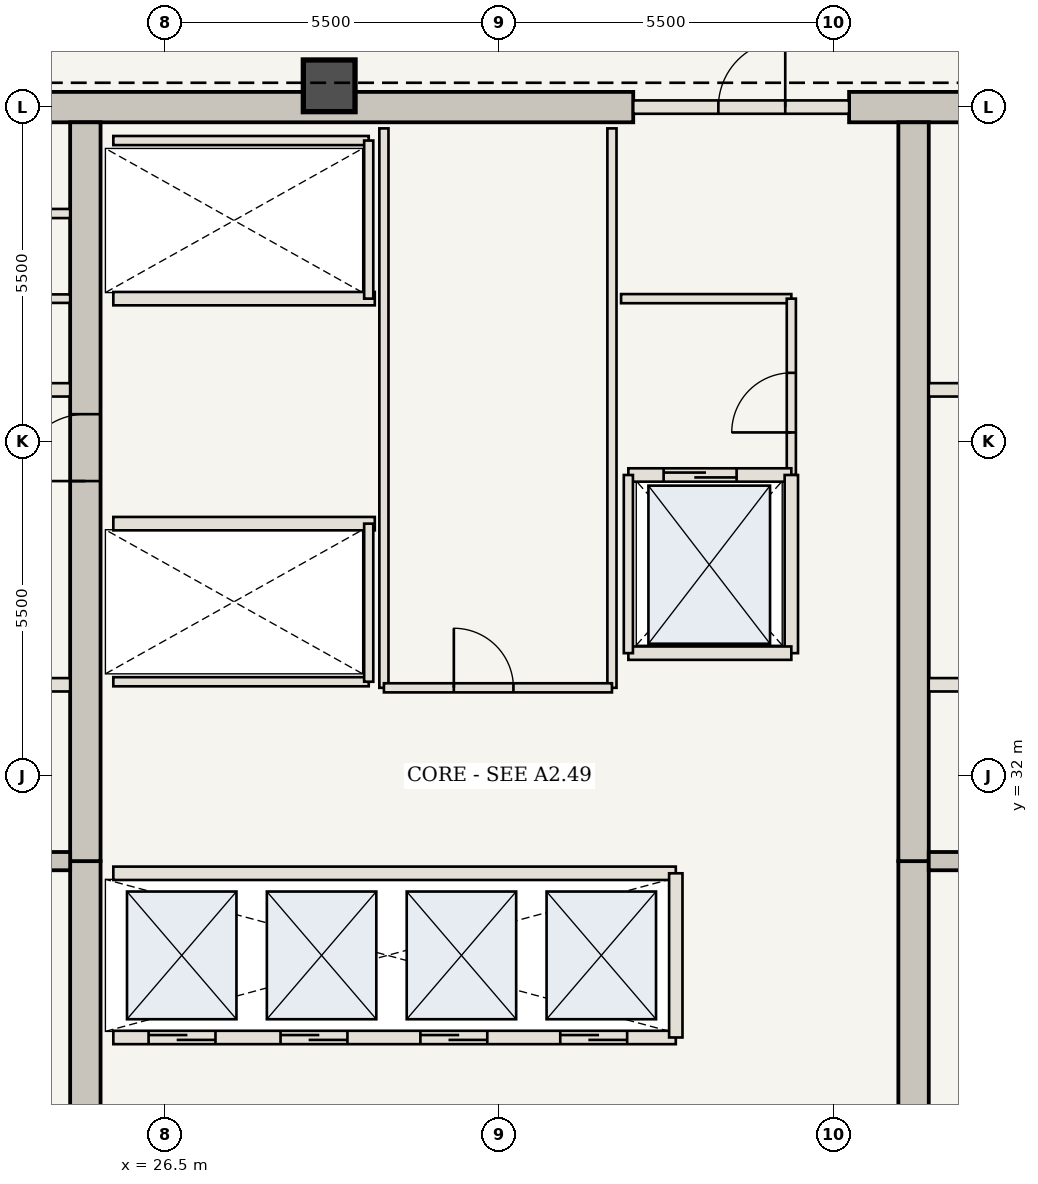
"""IFC4 building model, lengths in metres.
Left out: names, types, materials, properties, quantities, classifications, styles, units other than length and angle.
Written with IfcOpenShell. Run it as: python <this file> out.ifc"""

import sys

from ifc_helpers import new_model, si_unit, direction, frame, frame_2d, origin, origin_2d, place, context, subcontext, project, spatial, rectangle, extrude, element, fill, save


model = new_model("IFC4")
c1 = context("Model", 3, precision=1e-05, world=origin(), true_north=direction((0.0, 1.0)))
c2 = subcontext(c1, "Body", "Model", "MODEL_VIEW")
j1 = project(units=[si_unit("LENGTHUNIT", "METRE"), si_unit("PLANEANGLEUNIT", "RADIAN")], contexts=[c1])
p1 = place(None, origin())
s1 = spatial("IfcSite", under=j1, at=p1, CompositionType="ELEMENT")
p2 = place(p1, origin())
s2 = spatial("IfcBuilding", under=s1, at=p2, CompositionType="ELEMENT")
p3 = place(p2, frame((0.0, 0.0, 221.55)))
s3 = spatial("IfcBuildingStorey", under=s2, at=p3, CompositionType="ELEMENT", Elevation=221.55)
p4 = place(p3, frame((21.41, 43.0, 0.0), z_axis=(0.0, 0.0, 1.0), x_axis=(1.0, 0.0, 0.0)))
e1 = element("IfcWall", 1, at=p4, inside=s3, PredefinedType="SHEAR", context=c2, shape_type="SweptSolid", body=[
    extrude(rectangle(XDim=12.79, YDim=0.5, at=frame_2d((6.395, 0.0))), origin(), (0.0, 0.0, 1.0), 3.85),
])
p5 = place(p3, frame((37.75, 43.0, 0.0), z_axis=(0.0, 0.0, 1.0), x_axis=(1.0, 0.0, 0.0)))
e2 = element("IfcWall", 2, at=p5, inside=s3, PredefinedType="SHEAR", context=c2, shape_type="SweptSolid", body=[
    extrude(rectangle(XDim=4.84, YDim=0.5, at=frame_2d((2.42, 0.0))), origin(), (0.0, 0.0, 1.0), 3.85),
])
p6 = place(p3, frame((25.19, 21.2, 0.0), z_axis=(0.0, 0.0, 1.0), x_axis=(0.0, 1.0, 0.0)))
e3 = element("IfcWall", 3, at=p6, inside=s3, PredefinedType="SHEAR", context=c2, shape_type="SweptSolid", body=[
    extrude(rectangle(XDim=9.4, YDim=0.5, at=frame_2d((4.7, 0.0))), origin(), (0.0, 0.0, 1.0), 3.85),
])
p7 = place(p3, frame((25.19, 30.6, 0.0), z_axis=(0.0, 0.0, 1.0), x_axis=(0.0, 1.0, 0.0)))
e4 = element("IfcWall", 4, at=p7, inside=s3, PredefinedType="SHEAR", context=c2, shape_type="SweptSolid", body=[
    extrude(rectangle(XDim=12.15, YDim=0.5, at=frame_2d((6.075, 0.0))), origin(), (0.0, 0.0, 1.0), 3.85),
])
p8 = place(p7, frame((6.25, 0.0, 0.0)))
e5 = element("IfcOpeningElement", 5, at=p8, cuts=e4, PredefinedType="OPENING", context=c2, shape_type="SweptSolid", body=[
    extrude(rectangle(XDim=1.1, YDim=2.15, at=frame_2d((0.55, 1.075))), frame((0.0, 0.26, 0.0), z_axis=(0.0, -1.0, 0.0), x_axis=(1.0, 0.0, 0.0)), (0.0, 0.0, 1.0), 0.52),
])
p9 = place(p3, frame((38.81, 21.2, 0.0), z_axis=(0.0, 0.0, 1.0), x_axis=(0.0, 1.0, 0.0)))
e6 = element("IfcWall", 6, at=p9, inside=s3, PredefinedType="SHEAR", context=c2, shape_type="SweptSolid", body=[
    extrude(rectangle(XDim=9.4, YDim=0.5, at=frame_2d((4.7, 0.0))), origin(), (0.0, 0.0, 1.0), 3.85),
])
p10 = place(p3, frame((38.81, 30.6, 0.0), z_axis=(0.0, 0.0, 1.0), x_axis=(0.0, 1.0, 0.0)))
e7 = element("IfcWall", 7, at=p10, inside=s3, PredefinedType="SHEAR", context=c2, shape_type="SweptSolid", body=[
    extrude(rectangle(XDim=12.15, YDim=0.5, at=frame_2d((6.075, 0.0))), origin(), (0.0, 0.0, 1.0), 3.85),
])
p11 = place(p3, frame((29.2, 43.35, 0.0), z_axis=(0.0, 0.0, 1.0), x_axis=(1.0, 0.0, 0.0)))
e8 = element("IfcColumn", 8, at=p11, inside=s3, PredefinedType="COLUMN", context=c2, shape_type="SweptSolid", body=[
    extrude(rectangle(XDim=0.85, YDim=0.85, at=origin_2d()), origin(), (0.0, 0.0, 1.0), 3.85),
])
for number, where, z_axis, x_axis in (
    (9, (21.41, 30.6, 0.0), (0.0, 0.0, 1.0), (1.0, 0.0, 0.0)),
    (10, (39.06, 30.6, 0.0), (0.0, 0.0, 1.0), (1.0, 0.0, 0.0)),
):
    element("IfcWall", number, at=place(p3, frame(where, z_axis=z_axis, x_axis=x_axis)), inside=s3, PredefinedType="SHEAR", context=c2, shape_type="SweptSolid", body=[
        extrude(rectangle(XDim=3.53, YDim=0.3, at=frame_2d((1.765, 0.0))), origin(), (0.0, 0.0, 1.0), 3.685),
    ])
p12 = place(p3, frame((21.41, 33.5, 0.0), z_axis=(0.0, 0.0, 1.0), x_axis=(1.0, 0.0, 0.0)))
e11 = element("IfcWall", 11, at=p12, inside=s3, PredefinedType="STANDARD", context=c2, shape_type="SweptSolid", body=[
    extrude(rectangle(XDim=3.53, YDim=0.22, at=frame_2d((1.765, 0.0))), origin(), (0.0, 0.0, 1.0), 3.685),
])
p13 = place(p12, frame((0.75, 0.0, 0.0)))
e12 = element("IfcOpeningElement", 12, at=p13, cuts=e11, PredefinedType="OPENING", context=c2, shape_type="SweptSolid", body=[
    extrude(rectangle(XDim=1.2, YDim=2.2, at=frame_2d((0.6, 1.1))), frame((0.0, 0.12, 0.0), z_axis=(0.0, -1.0, 0.0), x_axis=(1.0, 0.0, 0.0)), (0.0, 0.0, 1.0), 0.24),
])
p14 = place(p3, frame((39.06, 33.5, 0.0), z_axis=(0.0, 0.0, 1.0), x_axis=(1.0, 0.0, 0.0)))
e13 = element("IfcWall", 13, at=p14, inside=s3, PredefinedType="STANDARD", context=c2, shape_type="SweptSolid", body=[
    extrude(rectangle(XDim=3.53, YDim=0.22, at=frame_2d((1.765, 0.0))), origin(), (0.0, 0.0, 1.0), 3.685),
])
p15 = place(p14, frame((1.55, 0.0, 0.0)))
e14 = element("IfcOpeningElement", 14, at=p15, cuts=e13, PredefinedType="OPENING", context=c2, shape_type="SweptSolid", body=[
    extrude(rectangle(XDim=1.2, YDim=2.2, at=frame_2d((0.6, 1.1))), frame((0.0, 0.12, 0.0), z_axis=(0.0, -1.0, 0.0), x_axis=(1.0, 0.0, 0.0)), (0.0, 0.0, 1.0), 0.24),
])
for number, where, z_axis, x_axis in (
    (15, (21.41, 38.35, 0.0), (0.0, 0.0, 1.0), (1.0, 0.0, 0.0)),
    (16, (39.06, 38.35, 0.0), (0.0, 0.0, 1.0), (1.0, 0.0, 0.0)),
):
    element("IfcWall", number, at=place(p3, frame(where, z_axis=z_axis, x_axis=x_axis)), inside=s3, PredefinedType="STANDARD", context=c2, shape_type="SweptSolid", body=[
        extrude(rectangle(XDim=3.53, YDim=0.22, at=frame_2d((1.765, 0.0))), origin(), (0.0, 0.0, 1.0), 3.685),
    ])
p16 = place(p3, frame((21.41, 39.85, 0.0), z_axis=(0.0, 0.0, 1.0), x_axis=(1.0, 0.0, 0.0)))
e17 = element("IfcWall", 17, at=p16, inside=s3, PredefinedType="STANDARD", context=c2, shape_type="SweptSolid", body=[
    extrude(rectangle(XDim=3.53, YDim=0.14, at=frame_2d((1.765, 0.0))), origin(), (0.0, 0.0, 1.0), 3.685),
])
p17 = place(p3, frame((21.41, 41.25, 0.0), z_axis=(0.0, 0.0, 1.0), x_axis=(1.0, 0.0, 0.0)))
e18 = element("IfcWall", 18, at=p17, inside=s3, PredefinedType="STANDARD", context=c2, shape_type="SweptSolid", body=[
    extrude(rectangle(XDim=3.53, YDim=0.15, at=frame_2d((1.765, 0.0))), origin(), (0.0, 0.0, 1.0), 3.685),
])
p18 = place(p3, frame((34.0, 39.85, 0.0), z_axis=(0.0, 0.0, 1.0), x_axis=(1.0, 0.0, 0.0)))
e19 = element("IfcWall", 19, at=p18, inside=s3, PredefinedType="STANDARD", context=c2, shape_type="SweptSolid", body=[
    extrude(rectangle(XDim=2.8, YDim=0.15, at=frame_2d((1.4, 0.0))), origin(), (0.0, 0.0, 1.0), 3.685),
])
p19 = place(p3, frame((36.8, 36.95, 0.0), z_axis=(0.0, 0.0, 1.0), x_axis=(0.0, 1.0, 0.0)))
e20 = element("IfcWall", 20, at=p19, inside=s3, PredefinedType="STANDARD", context=c2, shape_type="SweptSolid", body=[
    extrude(rectangle(XDim=2.9, YDim=0.15, at=frame_2d((1.45, 0.0))), origin(), (0.0, 0.0, 1.0), 3.685),
])
p20 = place(p19, frame((0.7, 0.0, 0.0)))
e21 = element("IfcOpeningElement", 21, at=p20, cuts=e20, PredefinedType="OPENING", context=c2, shape_type="SweptSolid", body=[
    extrude(rectangle(XDim=0.98, YDim=2.2, at=frame_2d((0.49, 1.1))), frame((0.0, 0.085, 0.0), z_axis=(0.0, -1.0, 0.0), x_axis=(1.0, 0.0, 0.0)), (0.0, 0.0, 1.0), 0.17),
])
p21 = place(p3, frame((25.65, 27.7, 0.0), z_axis=(0.0, 0.0, 1.0), x_axis=(1.0, 0.0, 0.0)))
e22 = element("IfcWall", 22, at=p21, inside=s3, PredefinedType="STANDARD", context=c2, shape_type="SweptSolid", body=[
    extrude(rectangle(XDim=9.25, YDim=0.22, at=frame_2d((4.625, 0.0))), origin(), (0.0, 0.0, 1.0), 3.685),
])
p22 = place(p21, frame((0.58, 0.0, 0.0)))
e23 = element("IfcOpeningElement", 23, at=p22, cuts=e22, PredefinedType="OPENING", context=c2, shape_type="SweptSolid", body=[
    extrude(rectangle(XDim=1.1, YDim=2.15, at=frame_2d((0.55, 1.075))), frame((0.0, 0.12, 0.0), z_axis=(0.0, -1.0, 0.0), x_axis=(1.0, 0.0, 0.0)), (0.0, 0.0, 1.0), 0.24),
])
p23 = place(p21, frame((2.75, 0.0, 0.0)))
e24 = element("IfcOpeningElement", 24, at=p23, cuts=e22, PredefinedType="OPENING", context=c2, shape_type="SweptSolid", body=[
    extrude(rectangle(XDim=1.1, YDim=2.15, at=frame_2d((0.55, 1.075))), frame((0.0, 0.12, 0.0), z_axis=(0.0, -1.0, 0.0), x_axis=(1.0, 0.0, 0.0)), (0.0, 0.0, 1.0), 0.24),
])
p24 = place(p21, frame((5.05, 0.0, 0.0)))
e25 = element("IfcOpeningElement", 25, at=p24, cuts=e22, PredefinedType="OPENING", context=c2, shape_type="SweptSolid", body=[
    extrude(rectangle(XDim=1.1, YDim=2.15, at=frame_2d((0.55, 1.075))), frame((0.0, 0.12, 0.0), z_axis=(0.0, -1.0, 0.0), x_axis=(1.0, 0.0, 0.0)), (0.0, 0.0, 1.0), 0.24),
])
p25 = place(p21, frame((7.35, 0.0, 0.0)))
e26 = element("IfcOpeningElement", 26, at=p25, cuts=e22, PredefinedType="OPENING", context=c2, shape_type="SweptSolid", body=[
    extrude(rectangle(XDim=1.1, YDim=2.15, at=frame_2d((0.55, 1.075))), frame((0.0, 0.12, 0.0), z_axis=(0.0, -1.0, 0.0), x_axis=(1.0, 0.0, 0.0)), (0.0, 0.0, 1.0), 0.24),
])
p26 = place(p3, frame((25.65, 30.4, 0.0), z_axis=(0.0, 0.0, 1.0), x_axis=(1.0, 0.0, 0.0)))
e27 = element("IfcWall", 27, at=p26, inside=s3, PredefinedType="STANDARD", context=c2, shape_type="SweptSolid", body=[
    extrude(rectangle(XDim=9.25, YDim=0.22, at=frame_2d((4.625, 0.0))), origin(), (0.0, 0.0, 1.0), 3.685),
])
p27 = place(p3, frame((34.9, 27.7, 0.0), z_axis=(0.0, 0.0, 1.0), x_axis=(0.0, 1.0, 0.0)))
e28 = element("IfcWall", 28, at=p27, inside=s3, PredefinedType="STANDARD", context=c2, shape_type="SweptSolid", body=[
    extrude(rectangle(XDim=2.7, YDim=0.22, at=frame_2d((1.35, 0.0))), origin(), (0.0, 0.0, 1.0), 3.685),
])
p28 = place(p3, frame((25.65, 36.15, 0.0), z_axis=(0.0, 0.0, 1.0), x_axis=(1.0, 0.0, 0.0)))
e29 = element("IfcWall", 29, at=p28, inside=s3, PredefinedType="STANDARD", context=c2, shape_type="SweptSolid", body=[
    extrude(rectangle(XDim=4.3, YDim=0.22, at=frame_2d((2.15, 0.0))), origin(), (0.0, 0.0, 1.0), 3.685),
])
p29 = place(p3, frame((25.65, 33.55, 0.0), z_axis=(0.0, 0.0, 1.0), x_axis=(1.0, 0.0, 0.0)))
e30 = element("IfcWall", 30, at=p29, inside=s3, PredefinedType="STANDARD", context=c2, shape_type="SweptSolid", body=[
    extrude(rectangle(XDim=4.2, YDim=0.15, at=frame_2d((2.1, 0.0))), origin(), (0.0, 0.0, 1.0), 3.685),
])
p30 = place(p3, frame((29.85, 33.55, 0.0), z_axis=(0.0, 0.0, 1.0), x_axis=(0.0, 1.0, 0.0)))
e31 = element("IfcWall", 31, at=p30, inside=s3, PredefinedType="STANDARD", context=c2, shape_type="SweptSolid", body=[
    extrude(rectangle(XDim=2.6, YDim=0.15, at=frame_2d((1.3, 0.0))), origin(), (0.0, 0.0, 1.0), 3.685),
])
p31 = place(p3, frame((25.65, 39.85, 0.0), z_axis=(0.0, 0.0, 1.0), x_axis=(1.0, 0.0, 0.0)))
e32 = element("IfcWall", 32, at=p31, inside=s3, PredefinedType="STANDARD", context=c2, shape_type="SweptSolid", body=[
    extrude(rectangle(XDim=4.3, YDim=0.22, at=frame_2d((2.15, 0.0))), origin(), (0.0, 0.0, 1.0), 3.685),
])
p32 = place(p3, frame((25.65, 42.45, 0.0), z_axis=(0.0, 0.0, 1.0), x_axis=(1.0, 0.0, 0.0)))
e33 = element("IfcWall", 33, at=p32, inside=s3, PredefinedType="STANDARD", context=c2, shape_type="SweptSolid", body=[
    extrude(rectangle(XDim=4.2, YDim=0.15, at=frame_2d((2.1, 0.0))), origin(), (0.0, 0.0, 1.0), 3.685),
])
p33 = place(p3, frame((29.85, 39.85, 0.0), z_axis=(0.0, 0.0, 1.0), x_axis=(0.0, 1.0, 0.0)))
e34 = element("IfcWall", 34, at=p33, inside=s3, PredefinedType="STANDARD", context=c2, shape_type="SweptSolid", body=[
    extrude(rectangle(XDim=2.6, YDim=0.15, at=frame_2d((1.3, 0.0))), origin(), (0.0, 0.0, 1.0), 3.685),
])
for number, where, z_axis, x_axis in (
    (35, (30.1, 33.45, 0.0), (0.0, 0.0, 1.0), (0.0, 1.0, 0.0)),
    (36, (33.85, 33.45, 0.0), (0.0, 0.0, 1.0), (0.0, 1.0, 0.0)),
):
    element("IfcWall", number, at=place(p3, frame(where, z_axis=z_axis, x_axis=x_axis)), inside=s3, PredefinedType="STANDARD", context=c2, shape_type="SweptSolid", body=[
        extrude(rectangle(XDim=9.2, YDim=0.15, at=frame_2d((4.6, 0.0))), origin(), (0.0, 0.0, 1.0), 3.685),
    ])
p34 = place(p3, frame((30.1, 33.45, 0.0), z_axis=(0.0, 0.0, 1.0), x_axis=(1.0, 0.0, 0.0)))
e37 = element("IfcWall", 37, at=p34, inside=s3, PredefinedType="STANDARD", context=c2, shape_type="SweptSolid", body=[
    extrude(rectangle(XDim=3.75, YDim=0.15, at=frame_2d((1.875, 0.0))), origin(), (0.0, 0.0, 1.0), 3.685),
])
p35 = place(p34, frame((1.15, 0.0, 0.0)))
e38 = element("IfcOpeningElement", 38, at=p35, cuts=e37, PredefinedType="OPENING", context=c2, shape_type="SweptSolid", body=[
    extrude(rectangle(XDim=0.98, YDim=2.2, at=frame_2d((0.49, 1.1))), frame((0.0, 0.085, 0.0), z_axis=(0.0, -1.0, 0.0), x_axis=(1.0, 0.0, 0.0)), (0.0, 0.0, 1.0), 0.17),
])
p36 = place(p3, frame((34.2, 43.0, 0.0), z_axis=(0.0, 0.0, 1.0), x_axis=(1.0, 0.0, 0.0)))
e39 = element("IfcWall", 39, at=p36, inside=s3, PredefinedType="STANDARD", context=c2, shape_type="SweptSolid", body=[
    extrude(rectangle(XDim=3.55, YDim=0.22, at=frame_2d((1.775, 0.0))), origin(), (0.0, 0.0, 1.0), 3.685),
])
p37 = place(p36, frame((1.4, 0.0, 0.0)))
e40 = element("IfcOpeningElement", 40, at=p37, cuts=e39, PredefinedType="OPENING", context=c2, shape_type="SweptSolid", body=[
    extrude(rectangle(XDim=1.1, YDim=2.15, at=frame_2d((0.55, 1.075))), frame((0.0, 0.12, 0.0), z_axis=(0.0, -1.0, 0.0), x_axis=(1.0, 0.0, 0.0)), (0.0, 0.0, 1.0), 0.24),
])
p38 = place(p3, frame((34.12, 36.95, 0.0), z_axis=(0.0, 0.0, 1.0), x_axis=(1.0, 0.0, 0.0)))
e41 = element("IfcWall", 41, at=p38, inside=s3, PredefinedType="STANDARD", context=c2, shape_type="SweptSolid", body=[
    extrude(rectangle(XDim=2.68, YDim=0.22, at=frame_2d((1.34, 0.0))), origin(), (0.0, 0.0, 1.0), 3.685),
])
p39 = place(p38, frame((0.58, 0.0, 0.0)))
e42 = element("IfcOpeningElement", 42, at=p39, cuts=e41, PredefinedType="OPENING", context=c2, shape_type="SweptSolid", body=[
    extrude(rectangle(XDim=1.2, YDim=2.2, at=frame_2d((0.6, 1.1))), frame((0.0, 0.12, 0.0), z_axis=(0.0, -1.0, 0.0), x_axis=(1.0, 0.0, 0.0)), (0.0, 0.0, 1.0), 0.24),
])
p40 = place(p3, frame((36.8, 34.02, 0.0), z_axis=(0.0, 0.0, 1.0), x_axis=(0.0, 1.0, 0.0)))
e43 = element("IfcWall", 43, at=p40, inside=s3, PredefinedType="STANDARD", context=c2, shape_type="SweptSolid", body=[
    extrude(rectangle(XDim=2.93, YDim=0.22, at=frame_2d((1.465, 0.0))), origin(), (0.0, 0.0, 1.0), 3.685),
])
p41 = place(p3, frame((34.12, 34.02, 0.0), z_axis=(0.0, 0.0, 1.0), x_axis=(1.0, 0.0, 0.0)))
e44 = element("IfcWall", 44, at=p41, inside=s3, PredefinedType="STANDARD", context=c2, shape_type="SweptSolid", body=[
    extrude(rectangle(XDim=2.68, YDim=0.22, at=frame_2d((1.34, 0.0))), origin(), (0.0, 0.0, 1.0), 3.685),
])
p42 = place(p3, frame((34.12, 34.02, 0.0), z_axis=(0.0, 0.0, 1.0), x_axis=(0.0, 1.0, 0.0)))
e45 = element("IfcWall", 45, at=p42, inside=s3, PredefinedType="STANDARD", context=c2, shape_type="SweptSolid", body=[
    extrude(rectangle(XDim=2.93, YDim=0.15, at=frame_2d((1.465, 0.0))), origin(), (0.0, 0.0, 1.0), 3.685),
])
p43 = place(p8, origin())
e46 = element("IfcDoor", 46, at=p43, inside=s3, OperationType="SINGLE_SWING_LEFT", PredefinedType="DOOR", context=c2, shape_type="SweptSolid", body=[
    extrude(rectangle(XDim=1.1, YDim=2.15, at=frame_2d((0.55, 1.075))), frame((0.0, 0.025, 0.0), z_axis=(0.0, -1.0, 0.0), x_axis=(1.0, 0.0, 0.0)), (0.0, 0.0, 1.0), 0.05),
])
fill(e5, e46)
p44 = place(p20, origin())
e47 = element("IfcDoor", 47, at=p44, inside=s3, OperationType="SINGLE_SWING_LEFT", PredefinedType="DOOR", context=c2, shape_type="SweptSolid", body=[
    extrude(rectangle(XDim=0.98, YDim=2.2, at=frame_2d((0.49, 1.1))), frame((0.0, 0.025, 0.0), z_axis=(0.0, -1.0, 0.0), x_axis=(1.0, 0.0, 0.0)), (0.0, 0.0, 1.0), 0.05),
])
fill(e21, e47)
p45 = place(p22, origin())
e48 = element("IfcDoor", 48, at=p45, inside=s3, OperationType="DOUBLE_DOOR_SLIDING", PredefinedType="DOOR", context=c2, shape_type="SweptSolid", body=[
    extrude(rectangle(XDim=1.1, YDim=2.15, at=frame_2d((0.55, 1.075))), frame((0.0, 0.025, 0.0), z_axis=(0.0, -1.0, 0.0), x_axis=(1.0, 0.0, 0.0)), (0.0, 0.0, 1.0), 0.05),
])
fill(e23, e48)
p46 = place(p23, origin())
e49 = element("IfcDoor", 49, at=p46, inside=s3, OperationType="DOUBLE_DOOR_SLIDING", PredefinedType="DOOR", context=c2, shape_type="SweptSolid", body=[
    extrude(rectangle(XDim=1.1, YDim=2.15, at=frame_2d((0.55, 1.075))), frame((0.0, 0.025, 0.0), z_axis=(0.0, -1.0, 0.0), x_axis=(1.0, 0.0, 0.0)), (0.0, 0.0, 1.0), 0.05),
])
fill(e24, e49)
p47 = place(p24, origin())
e50 = element("IfcDoor", 50, at=p47, inside=s3, OperationType="DOUBLE_DOOR_SLIDING", PredefinedType="DOOR", context=c2, shape_type="SweptSolid", body=[
    extrude(rectangle(XDim=1.1, YDim=2.15, at=frame_2d((0.55, 1.075))), frame((0.0, 0.025, 0.0), z_axis=(0.0, -1.0, 0.0), x_axis=(1.0, 0.0, 0.0)), (0.0, 0.0, 1.0), 0.05),
])
fill(e25, e50)
p48 = place(p25, origin())
e51 = element("IfcDoor", 51, at=p48, inside=s3, OperationType="DOUBLE_DOOR_SLIDING", PredefinedType="DOOR", context=c2, shape_type="SweptSolid", body=[
    extrude(rectangle(XDim=1.1, YDim=2.15, at=frame_2d((0.55, 1.075))), frame((0.0, 0.025, 0.0), z_axis=(0.0, -1.0, 0.0), x_axis=(1.0, 0.0, 0.0)), (0.0, 0.0, 1.0), 0.05),
])
fill(e26, e51)
p49 = place(p35, origin())
e52 = element("IfcDoor", 52, at=p49, inside=s3, OperationType="SINGLE_SWING_LEFT", PredefinedType="DOOR", context=c2, shape_type="SweptSolid", body=[
    extrude(rectangle(XDim=0.98, YDim=2.2, at=frame_2d((0.49, 1.1))), frame((0.0, 0.025, 0.0), z_axis=(0.0, -1.0, 0.0), x_axis=(1.0, 0.0, 0.0)), (0.0, 0.0, 1.0), 0.05),
])
fill(e38, e52)
p50 = place(p37, origin())
e53 = element("IfcDoor", 53, at=p50, inside=s3, OperationType="SINGLE_SWING_RIGHT", PredefinedType="DOOR", context=c2, shape_type="SweptSolid", body=[
    extrude(rectangle(XDim=1.1, YDim=2.15, at=frame_2d((0.55, 1.075))), frame((0.0, 0.025, 0.0), z_axis=(0.0, -1.0, 0.0), x_axis=(1.0, 0.0, 0.0)), (0.0, 0.0, 1.0), 0.05),
])
fill(e40, e53)
p51 = place(p39, origin())
e54 = element("IfcDoor", 54, at=p51, inside=s3, OperationType="DOUBLE_DOOR_SLIDING", PredefinedType="DOOR", context=c2, shape_type="SweptSolid", body=[
    extrude(rectangle(XDim=1.2, YDim=2.2, at=frame_2d((0.6, 1.1))), frame((0.0, 0.025, 0.0), z_axis=(0.0, -1.0, 0.0), x_axis=(1.0, 0.0, 0.0)), (0.0, 0.0, 1.0), 0.05),
])
fill(e42, e54)
save(model, sys.argv[1])
